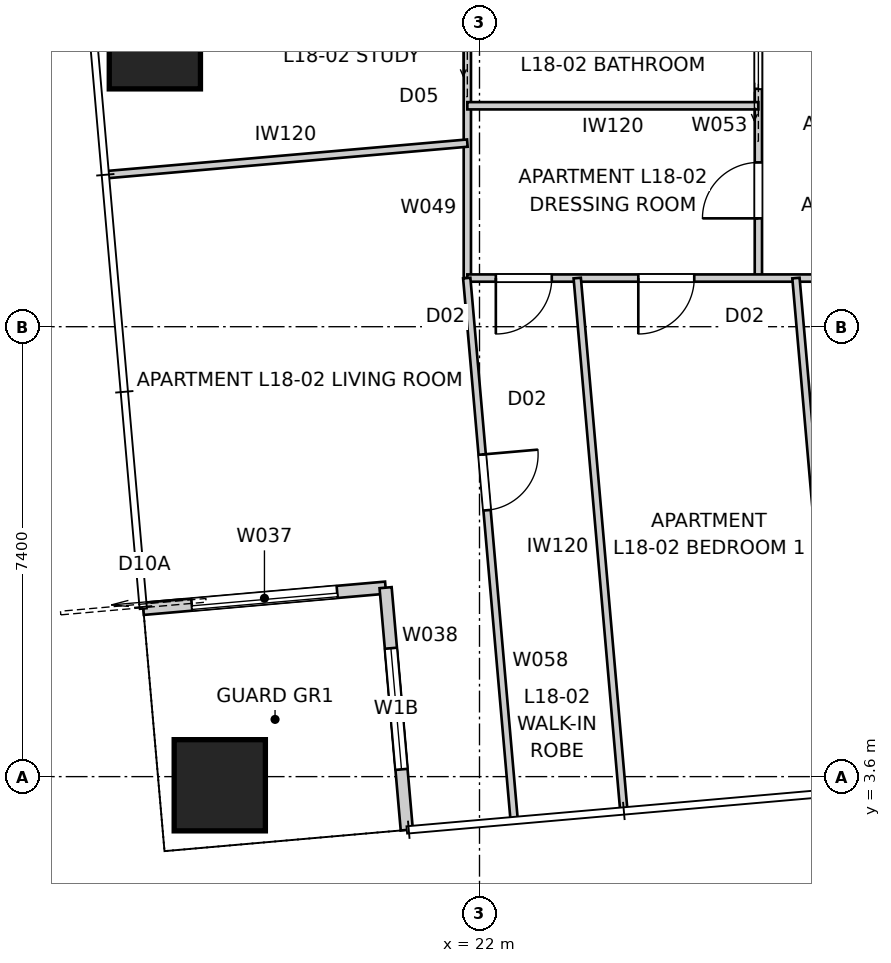
"""IFC4 building model, lengths in metres.
Left out: names, types, materials, properties, quantities, classifications, styles, units other than length and angle.
Written with IfcOpenShell. Run it as: python <this file> out.ifc"""

import sys

from ifc_helpers import new_model, si_unit, direction, frame, frame_2d, origin, origin_2d, place, context, subcontext, project, spatial, rectangle, extrude, element, fill, save


model = new_model("IFC4")
c1 = context("Model", 3, precision=1e-05, world=origin(), true_north=direction((0.0, 1.0)))
c2 = subcontext(c1, "Body", "Model", "MODEL_VIEW")
j1 = project(units=[si_unit("LENGTHUNIT", "METRE"), si_unit("PLANEANGLEUNIT", "RADIAN")], contexts=[c1])
p1 = place(None, origin())
s1 = spatial("IfcSite", under=j1, at=p1, CompositionType="ELEMENT")
p2 = place(p1, origin())
s2 = spatial("IfcBuilding", under=s1, at=p2, CompositionType="ELEMENT")
p3 = place(p2, frame((0.0, 0.0, 67.6)))
s3 = spatial("IfcBuildingStorey", under=s2, at=p3, CompositionType="ELEMENT", Elevation=67.6)
for number, where, z_axis, x_axis in (
    (1, (17.729, 3.458, 0.0), (0.0, 0.0, 1.0), (1.0, 0.0, 0.0)),
    (2, (16.661, 15.661, 0.0), (0.0, 0.0, 1.0), (1.0, 0.0, 0.0)),
):
    element("IfcColumn", number, at=place(p3, frame(where, z_axis=z_axis, x_axis=x_axis)), inside=s3, PredefinedType="COLUMN", context=c2, shape_type="SweptSolid", body=[
        extrude(rectangle(XDim=1.5, YDim=1.5, at=origin_2d()), origin(), (0.0, 0.0, 1.0), 3.4),
    ])
p4 = place(p3, frame((16.471, 6.359, 0.0), z_axis=(0.0, 0.0, 1.0), x_axis=(0.99619418125, 0.087161650072, 0.0)))
e3 = element("IfcWall", 3, at=p4, inside=s3, PredefinedType="SOLIDWALL", context=c2, shape_type="SweptSolid", body=[
    extrude(rectangle(XDim=4.0, YDim=0.2, at=frame_2d((2.0, 0.0))), origin(), (0.0, 0.0, 1.0), 3.25),
])
p5 = place(p4, frame((0.8, 0.0, 0.0)))
e4 = element("IfcOpeningElement", 4, at=p5, cuts=e3, PredefinedType="OPENING", context=c2, shape_type="SweptSolid", body=[
    extrude(rectangle(XDim=2.4, YDim=2.1, at=frame_2d((1.2, 1.05))), frame((0.0, 0.11, 0.0), z_axis=(0.0, -1.0, 0.0), x_axis=(1.0, 0.0, 0.0)), (0.0, 0.0, 1.0), 0.22),
])
p6 = place(p3, frame((20.456, 6.708, 0.0), z_axis=(0.0, 0.0, 1.0), x_axis=(0.087156350505, -0.99619464492, 0.0)))
e5 = element("IfcWall", 5, at=p6, inside=s3, PredefinedType="SOLIDWALL", context=c2, shape_type="SweptSolid", body=[
    extrude(rectangle(XDim=4.0, YDim=0.2, at=frame_2d((2.0, 0.0))), origin(), (0.0, 0.0, 1.0), 3.25),
])
p7 = place(p6, frame((1.0, 0.0, 0.45)))
e6 = element("IfcOpeningElement", 6, at=p7, cuts=e5, PredefinedType="OPENING", context=c2, shape_type="SweptSolid", body=[
    extrude(rectangle(XDim=2.0, YDim=1.8, at=frame_2d((1.0, 0.9))), frame((0.0, 0.11, 0.0), z_axis=(0.0, -1.0, 0.0), x_axis=(1.0, 0.0, 0.0)), (0.0, 0.0, 1.0), 0.22),
])
p8 = place(p3, frame((21.8, 11.8, 0.0), z_axis=(0.0, 0.0, 1.0), x_axis=(0.0, 1.0, 0.0)))
e7 = element("IfcWall", 7, at=p8, inside=s3, PredefinedType="PARTITIONING", context=c2, shape_type="SweptSolid", body=[
    extrude(rectangle(XDim=20.065, YDim=0.12, at=frame_2d((10.032, 0.0))), origin(), (0.0, 0.0, 1.0), 3.25),
])
p9 = place(p8, frame((6.798, 0.0, 0.0)))
e8 = element("IfcOpeningElement", 8, at=p9, cuts=e7, PredefinedType="OPENING", context=c2, shape_type="SweptSolid", body=[
    extrude(rectangle(XDim=0.92, YDim=2.34, at=frame_2d((0.46, 1.17))), frame((0.0, 0.07, 0.0), z_axis=(0.0, -1.0, 0.0), x_axis=(1.0, 0.0, 0.0)), (0.0, 0.0, 1.0), 0.14),
])
p10 = place(p8, frame((3.845, 0.0, 0.0)))
e9 = element("IfcOpeningElement", 9, at=p10, cuts=e7, PredefinedType="OPENING", context=c2, shape_type="SweptSolid", body=[
    extrude(rectangle(XDim=0.96, YDim=2.1, at=frame_2d((0.48, 1.05))), frame((0.0, 0.07, 0.0), z_axis=(0.0, -1.0, 0.0), x_axis=(1.0, 0.0, 0.0)), (0.0, 0.0, 1.0), 0.14),
])
p11 = place(p8, frame((10.732, 0.0, 0.0)))
e10 = element("IfcOpeningElement", 10, at=p11, cuts=e7, PredefinedType="OPENING", context=c2, shape_type="SweptSolid", body=[
    extrude(rectangle(XDim=0.96, YDim=2.1, at=frame_2d((0.48, 1.05))), frame((0.0, 0.07, 0.0), z_axis=(0.0, -1.0, 0.0), x_axis=(1.0, 0.0, 0.0)), (0.0, 0.0, 1.0), 0.14),
])
p12 = place(p8, frame((17.856, 0.0, 0.0)))
e11 = element("IfcOpeningElement", 11, at=p12, cuts=e7, PredefinedType="OPENING", context=c2, shape_type="SweptSolid", body=[
    extrude(rectangle(XDim=0.96, YDim=2.1, at=frame_2d((0.48, 1.05))), frame((0.0, 0.07, 0.0), z_axis=(0.0, -1.0, 0.0), x_axis=(1.0, 0.0, 0.0)), (0.0, 0.0, 1.0), 0.14),
])
p13 = place(p8, frame((15.027, 0.0, 0.0)))
e12 = element("IfcOpeningElement", 12, at=p13, cuts=e7, PredefinedType="OPENING", context=c2, shape_type="SweptSolid", body=[
    extrude(rectangle(XDim=0.96, YDim=2.1, at=frame_2d((0.48, 1.05))), frame((0.0, 0.07, 0.0), z_axis=(0.0, -1.0, 0.0), x_axis=(1.0, 0.0, 0.0)), (0.0, 0.0, 1.0), 0.14),
])
p14 = place(p3, frame((26.586, 11.8, 0.0), z_axis=(0.0, 0.0, 1.0), x_axis=(0.0, 1.0, 0.0)))
e13 = element("IfcWall", 13, at=p14, inside=s3, PredefinedType="PARTITIONING", context=c2, shape_type="SweptSolid", body=[
    extrude(rectangle(XDim=4.4, YDim=0.12, at=frame_2d((2.2, 0.0))), origin(), (0.0, 0.0, 1.0), 3.25),
])
p15 = place(p14, frame((0.982, 0.0, 0.0)))
e14 = element("IfcOpeningElement", 14, at=p15, cuts=e13, PredefinedType="OPENING", context=c2, shape_type="SweptSolid", body=[
    extrude(rectangle(XDim=0.92, YDim=2.34, at=frame_2d((0.46, 1.17))), frame((0.0, 0.07, 0.0), z_axis=(0.0, -1.0, 0.0), x_axis=(1.0, 0.0, 0.0)), (0.0, 0.0, 1.0), 0.14),
])
p16 = place(p14, frame((3.112, 0.0, 0.0)))
e15 = element("IfcOpeningElement", 15, at=p16, cuts=e13, PredefinedType="OPENING", context=c2, shape_type="SweptSolid", body=[
    extrude(rectangle(XDim=0.96, YDim=2.1, at=frame_2d((0.48, 1.05))), frame((0.0, 0.07, 0.0), z_axis=(0.0, -1.0, 0.0), x_axis=(1.0, 0.0, 0.0)), (0.0, 0.0, 1.0), 0.14),
])
p17 = place(p3, frame((58.2, 11.8, 0.0), z_axis=(0.0, 0.0, 1.0), x_axis=(-1.0, 0.0, 0.0)))
e16 = element("IfcWall", 16, at=p17, inside=s3, PredefinedType="PARTITIONING", context=c2, shape_type="SweptSolid", body=[
    extrude(rectangle(XDim=36.4, YDim=0.12, at=frame_2d((18.2, 0.0))), origin(), (0.0, 0.0, 1.0), 3.25),
])
p18 = place(p17, frame((11.12, 0.0, 0.0)))
e17 = element("IfcOpeningElement", 17, at=p18, cuts=e16, PredefinedType="OPENING", context=c2, shape_type="SweptSolid", body=[
    extrude(rectangle(XDim=0.92, YDim=2.34, at=frame_2d((0.46, 1.17))), frame((0.0, 0.07, 0.0), z_axis=(0.0, -1.0, 0.0), x_axis=(1.0, 0.0, 0.0)), (0.0, 0.0, 1.0), 0.14),
])
p19 = place(p17, frame((17.971, 0.0, 0.0)))
e18 = element("IfcOpeningElement", 18, at=p19, cuts=e16, PredefinedType="OPENING", context=c2, shape_type="SweptSolid", body=[
    extrude(rectangle(XDim=0.92, YDim=2.34, at=frame_2d((0.46, 1.17))), frame((0.0, 0.07, 0.0), z_axis=(0.0, -1.0, 0.0), x_axis=(1.0, 0.0, 0.0)), (0.0, 0.0, 1.0), 0.14),
])
p20 = place(p17, frame((28.877, 0.0, 0.0)))
e19 = element("IfcOpeningElement", 19, at=p20, cuts=e16, PredefinedType="OPENING", context=c2, shape_type="SweptSolid", body=[
    extrude(rectangle(XDim=0.92, YDim=2.34, at=frame_2d((0.46, 1.17))), frame((0.0, 0.07, 0.0), z_axis=(0.0, -1.0, 0.0), x_axis=(1.0, 0.0, 0.0)), (0.0, 0.0, 1.0), 0.14),
])
p21 = place(p17, frame((7.16, 0.0, 0.0)))
e20 = element("IfcOpeningElement", 20, at=p21, cuts=e16, PredefinedType="OPENING", context=c2, shape_type="SweptSolid", body=[
    extrude(rectangle(XDim=0.96, YDim=2.1, at=frame_2d((0.48, 1.05))), frame((0.0, 0.07, 0.0), z_axis=(0.0, -1.0, 0.0), x_axis=(1.0, 0.0, 0.0)), (0.0, 0.0, 1.0), 0.14),
])
p22 = place(p17, frame((15.181, 0.0, 0.0)))
e21 = element("IfcOpeningElement", 21, at=p22, cuts=e16, PredefinedType="OPENING", context=c2, shape_type="SweptSolid", body=[
    extrude(rectangle(XDim=0.96, YDim=2.1, at=frame_2d((0.48, 1.05))), frame((0.0, 0.07, 0.0), z_axis=(0.0, -1.0, 0.0), x_axis=(1.0, 0.0, 0.0)), (0.0, 0.0, 1.0), 0.14),
])
p23 = place(p17, frame((32.668, 0.0, 0.0)))
e22 = element("IfcOpeningElement", 22, at=p23, cuts=e16, PredefinedType="OPENING", context=c2, shape_type="SweptSolid", body=[
    extrude(rectangle(XDim=0.92, YDim=2.34, at=frame_2d((0.46, 1.17))), frame((0.0, 0.07, 0.0), z_axis=(0.0, -1.0, 0.0), x_axis=(1.0, 0.0, 0.0)), (0.0, 0.0, 1.0), 0.14),
])
p24 = place(p17, frame((35.011, 0.0, 0.0)))
e23 = element("IfcOpeningElement", 23, at=p24, cuts=e16, PredefinedType="OPENING", context=c2, shape_type="SweptSolid", body=[
    extrude(rectangle(XDim=0.92, YDim=2.34, at=frame_2d((0.46, 1.17))), frame((0.0, 0.07, 0.0), z_axis=(0.0, -1.0, 0.0), x_axis=(1.0, 0.0, 0.0)), (0.0, 0.0, 1.0), 0.14),
])
p25 = place(p17, frame((0.675, 0.0, 0.0)))
e24 = element("IfcOpeningElement", 24, at=p25, cuts=e16, PredefinedType="OPENING", context=c2, shape_type="SweptSolid", body=[
    extrude(rectangle(XDim=0.92, YDim=2.34, at=frame_2d((0.46, 1.17))), frame((0.0, 0.07, 0.0), z_axis=(0.0, -1.0, 0.0), x_axis=(1.0, 0.0, 0.0)), (0.0, 0.0, 1.0), 0.14),
])
p26 = place(p17, frame((25.11, 0.0, 0.0)))
e25 = element("IfcOpeningElement", 25, at=p26, cuts=e16, PredefinedType="OPENING", context=c2, shape_type="SweptSolid", body=[
    extrude(rectangle(XDim=0.96, YDim=2.1, at=frame_2d((0.48, 1.05))), frame((0.0, 0.07, 0.0), z_axis=(0.0, -1.0, 0.0), x_axis=(1.0, 0.0, 0.0)), (0.0, 0.0, 1.0), 0.14),
])
p27 = place(p17, frame((3.904, 0.0, 0.0)))
e26 = element("IfcOpeningElement", 26, at=p27, cuts=e16, PredefinedType="OPENING", context=c2, shape_type="SweptSolid", body=[
    extrude(rectangle(XDim=0.96, YDim=2.1, at=frame_2d((0.48, 1.05))), frame((0.0, 0.07, 0.0), z_axis=(0.0, -1.0, 0.0), x_axis=(1.0, 0.0, 0.0)), (0.0, 0.0, 1.0), 0.14),
])
p28 = place(p3, frame((26.586, 14.634, 0.0), z_axis=(0.0, 0.0, 1.0), x_axis=(-1.0, 0.0, 0.0)))
e27 = element("IfcWall", 27, at=p28, inside=s3, PredefinedType="PARTITIONING", context=c2, shape_type="SweptSolid", body=[
    extrude(rectangle(XDim=4.786, YDim=0.12, at=frame_2d((2.393, 0.0))), origin(), (0.0, 0.0, 1.0), 3.25),
])
p29 = place(p3, frame((15.886, 13.502, 0.0), z_axis=(0.0, 0.0, 1.0), x_axis=(0.996195547509, 0.087146033323, 0.0)))
e28 = element("IfcWall", 28, at=p29, inside=s3, PredefinedType="PARTITIONING", context=c2, shape_type="SweptSolid", body=[
    extrude(rectangle(XDim=5.937, YDim=0.12, at=frame_2d((2.968, 0.0))), origin(), (0.0, 0.0, 1.0), 2.638),
])
p30 = place(p3, frame((21.79, 11.8, 0.0), z_axis=(0.0, 0.0, 1.0), x_axis=(0.087153024244, -0.996194935926, 0.0)))
e29 = element("IfcWall", 29, at=p30, inside=s3, PredefinedType="PARTITIONING", context=c2, shape_type="SweptSolid", body=[
    extrude(rectangle(XDim=8.917, YDim=0.12, at=frame_2d((4.458, 0.0))), origin(), (0.0, 0.0, 1.0), 3.25),
])
p31 = place(p30, frame((2.913, 0.0, 0.0)))
e30 = element("IfcOpeningElement", 30, at=p31, cuts=e29, PredefinedType="OPENING", context=c2, shape_type="SweptSolid", body=[
    extrude(rectangle(XDim=0.92, YDim=2.34, at=frame_2d((0.46, 1.17))), frame((0.0, 0.07, 0.0), z_axis=(0.0, -1.0, 0.0), x_axis=(1.0, 0.0, 0.0)), (0.0, 0.0, 1.0), 0.14),
])
p32 = place(p3, frame((27.204, 11.8, 0.0), z_axis=(0.0, 0.0, 1.0), x_axis=(0.087167308925, -0.996193686115, 0.0)))
e31 = element("IfcWall", 31, at=p32, inside=s3, PredefinedType="PARTITIONING", context=c2, shape_type="SweptSolid", body=[
    extrude(rectangle(XDim=8.445, YDim=0.12, at=frame_2d((4.222, 0.0))), origin(), (0.0, 0.0, 1.0), 2.638),
])
p33 = place(p3, frame((24.371, 3.075, 0.0), z_axis=(0.0, 0.0, 1.0), x_axis=(-0.087169716747, 0.996193475426, 0.0)))
e32 = element("IfcWall", 32, at=p33, inside=s3, PredefinedType="PARTITIONING", context=c2, shape_type="SweptSolid", body=[
    extrude(rectangle(XDim=8.758, YDim=0.12, at=frame_2d((4.379, 0.0))), origin(), (0.0, 0.0, 1.0), 3.25),
])
p34 = place(p5, origin())
e33 = element("IfcDoor", 33, at=p34, inside=s3, OperationType="SLIDING_TO_LEFT", PredefinedType="DOOR", context=c2, shape_type="SweptSolid", body=[
    extrude(rectangle(XDim=2.4, YDim=2.1, at=frame_2d((1.2, 1.05))), frame((0.0, 0.025, 0.0), z_axis=(0.0, -1.0, 0.0), x_axis=(1.0, 0.0, 0.0)), (0.0, 0.0, 1.0), 0.05),
])
fill(e4, e33)
p35 = place(p7, origin())
e34 = element("IfcWindow", 34, at=p35, inside=s3, PartitioningType="SINGLE_PANEL", PredefinedType="WINDOW", context=c2, shape_type="SweptSolid", body=[
    extrude(rectangle(XDim=2.0, YDim=1.8, at=frame_2d((1.0, 0.9))), frame((0.0, 0.03, 0.0), z_axis=(0.0, -1.0, 0.0), x_axis=(1.0, 0.0, 0.0)), (0.0, 0.0, 1.0), 0.06),
])
fill(e6, e34)
p36 = place(p15, origin())
e35 = element("IfcDoor", 35, at=p36, inside=s3, OperationType="SINGLE_SWING_LEFT", PredefinedType="DOOR", context=c2, shape_type="SweptSolid", body=[
    extrude(rectangle(XDim=0.92, YDim=2.34, at=frame_2d((0.46, 1.17))), frame((0.0, 0.025, 0.0), z_axis=(0.0, -1.0, 0.0), x_axis=(1.0, 0.0, 0.0)), (0.0, 0.0, 1.0), 0.05),
])
fill(e14, e35)
p37 = place(p16, origin())
e36 = element("IfcDoor", 36, at=p37, inside=s3, OperationType="SLIDING_TO_LEFT", PredefinedType="DOOR", context=c2, shape_type="SweptSolid", body=[
    extrude(rectangle(XDim=0.96, YDim=2.1, at=frame_2d((0.48, 1.05))), frame((0.0, 0.025, 0.0), z_axis=(0.0, -1.0, 0.0), x_axis=(1.0, 0.0, 0.0)), (0.0, 0.0, 1.0), 0.05),
])
fill(e15, e36)
p38 = place(p23, origin())
e37 = element("IfcDoor", 37, at=p38, inside=s3, OperationType="SINGLE_SWING_RIGHT", PredefinedType="DOOR", context=c2, shape_type="SweptSolid", body=[
    extrude(rectangle(XDim=0.92, YDim=2.34, at=frame_2d((0.46, 1.17))), frame((0.0, 0.025, 0.0), z_axis=(0.0, -1.0, 0.0), x_axis=(1.0, 0.0, 0.0)), (0.0, 0.0, 1.0), 0.05),
])
fill(e22, e37)
p39 = place(p24, origin())
e38 = element("IfcDoor", 38, at=p39, inside=s3, OperationType="SINGLE_SWING_RIGHT", PredefinedType="DOOR", context=c2, shape_type="SweptSolid", body=[
    extrude(rectangle(XDim=0.92, YDim=2.34, at=frame_2d((0.46, 1.17))), frame((0.0, 0.025, 0.0), z_axis=(0.0, -1.0, 0.0), x_axis=(1.0, 0.0, 0.0)), (0.0, 0.0, 1.0), 0.05),
])
fill(e23, e38)
p40 = place(p31, origin())
e39 = element("IfcDoor", 39, at=p40, inside=s3, OperationType="SINGLE_SWING_LEFT", PredefinedType="DOOR", context=c2, shape_type="SweptSolid", body=[
    extrude(rectangle(XDim=0.92, YDim=2.34, at=frame_2d((0.46, 1.17))), frame((0.0, 0.025, 0.0), z_axis=(0.0, -1.0, 0.0), x_axis=(1.0, 0.0, 0.0)), (0.0, 0.0, 1.0), 0.05),
])
fill(e30, e39)
save(model, sys.argv[1])
